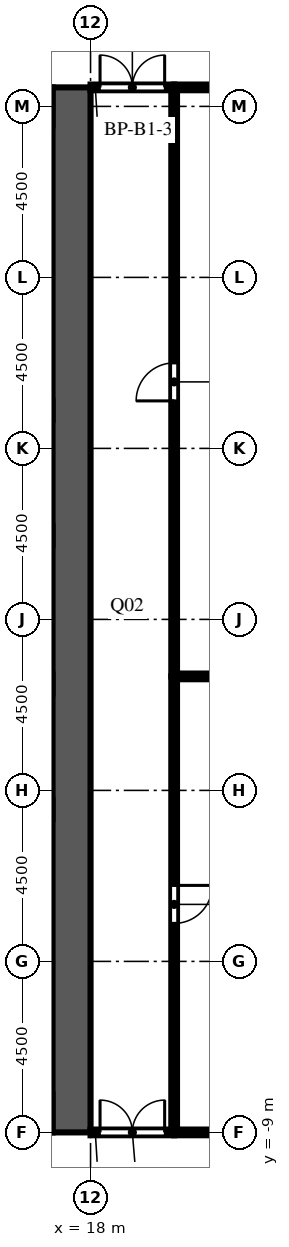
"""IFC4 building model, lengths in metres.
Left out: names, types, materials, properties, quantities, classifications, styles, units other than length and angle.
Written with IfcOpenShell. Run it as: python <this file> out.ifc"""

import sys

from ifc_helpers import new_model, si_unit, direction, frame, frame_2d, origin, place, context, subcontext, project, spatial, rectangle, extrude, element, fill, save


model = new_model("IFC4")
c1 = context("Model", 3, precision=1e-05, world=origin(), true_north=direction((0.0, 1.0)))
c2 = subcontext(c1, "Body", "Model", "MODEL_VIEW")
j1 = project(units=[si_unit("LENGTHUNIT", "METRE"), si_unit("PLANEANGLEUNIT", "RADIAN")], contexts=[c1])
p1 = place(None, origin())
s1 = spatial("IfcSite", under=j1, at=p1, CompositionType="ELEMENT")
p2 = place(p1, origin())
s2 = spatial("IfcBuilding", under=s1, at=p2, CompositionType="ELEMENT")
p3 = place(p2, frame((0.0, 0.0, -5.0)))
s3 = spatial("IfcBuildingStorey", under=s2, at=p3, CompositionType="ELEMENT", Elevation=-5.0)
p4 = place(p3, frame((17.5, -9.0, 0.0), z_axis=(0.0, 0.0, 1.0), x_axis=(0.0, 1.0, 0.0)))
e1 = element("IfcWall", 1, at=p4, inside=s3, PredefinedType="SHEAR", context=c2, shape_type="SweptSolid", body=[
    extrude(rectangle(XDim=27.5, YDim=1.0, at=frame_2d((13.75, 0.0))), origin(), (0.0, 0.0, 1.0), 5.0),
])
p5 = place(p4, frame((12.55, 0.0, 0.0)))
e2 = element("IfcOpeningElement", 2, at=p5, cuts=e1, PredefinedType="OPENING", context=c2, shape_type="SweptSolid", body=[
    extrude(rectangle(XDim=2.4, YDim=2.4, at=frame_2d((1.2, 1.2))), frame((0.0, 0.51, 0.0), z_axis=(0.0, -1.0, 0.0), x_axis=(1.0, 0.0, 0.0)), (0.0, 0.0, 1.0), 1.02),
])
p6 = place(p4, frame((6.825, 0.0, 0.0)))
e3 = element("IfcOpeningElement", 3, at=p6, cuts=e1, PredefinedType="OPENING", context=c2, shape_type="SweptSolid", body=[
    extrude(rectangle(XDim=1.2, YDim=2.1, at=frame_2d((0.6, 1.05))), frame((0.0, 0.51, 0.0), z_axis=(0.0, -1.0, 0.0), x_axis=(1.0, 0.0, 0.0)), (0.0, 0.0, 1.0), 1.02),
])
p7 = place(p4, frame((19.475, 0.0, 0.0)))
e4 = element("IfcOpeningElement", 4, at=p7, cuts=e1, PredefinedType="OPENING", context=c2, shape_type="SweptSolid", body=[
    extrude(rectangle(XDim=1.2, YDim=2.1, at=frame_2d((0.6, 1.05))), frame((0.0, 0.51, 0.0), z_axis=(0.0, -1.0, 0.0), x_axis=(1.0, 0.0, 0.0)), (0.0, 0.0, 1.0), 1.02),
])
p8 = place(p3, frame((18.0, -9.0, 0.0), z_axis=(0.0, 0.0, 1.0), x_axis=(1.0, 0.0, 0.0)))
e5 = element("IfcWall", 5, at=p8, inside=s3, PredefinedType="PARTITIONING", context=c2, shape_type="SweptSolid", body=[
    extrude(rectangle(XDim=2.2, YDim=0.15, at=frame_2d((1.1, 0.0))), origin(), (0.0, 0.0, 1.0), 4.5),
])
p9 = place(p8, frame((0.25, 0.0, 0.0)))
e6 = element("IfcOpeningElement", 6, at=p9, cuts=e5, PredefinedType="OPENING", context=c2, shape_type="SweptSolid", body=[
    extrude(rectangle(XDim=1.7, YDim=2.1, at=frame_2d((0.85, 1.05))), frame((0.0, 0.085, 0.0), z_axis=(0.0, -1.0, 0.0), x_axis=(1.0, 0.0, 0.0)), (0.0, 0.0, 1.0), 0.17),
])
p10 = place(p3, frame((18.0, 18.5, 0.0), z_axis=(0.0, 0.0, 1.0), x_axis=(1.0, 0.0, 0.0)))
e7 = element("IfcWall", 7, at=p10, inside=s3, PredefinedType="PARTITIONING", context=c2, shape_type="SweptSolid", body=[
    extrude(rectangle(XDim=2.2, YDim=0.15, at=frame_2d((1.1, 0.0))), origin(), (0.0, 0.0, 1.0), 4.5),
])
p11 = place(p10, frame((0.25, 0.0, 0.0)))
e8 = element("IfcOpeningElement", 8, at=p11, cuts=e7, PredefinedType="OPENING", context=c2, shape_type="SweptSolid", body=[
    extrude(rectangle(XDim=1.7, YDim=2.1, at=frame_2d((0.85, 1.05))), frame((0.0, 0.085, 0.0), z_axis=(0.0, -1.0, 0.0), x_axis=(1.0, 0.0, 0.0)), (0.0, 0.0, 1.0), 0.17),
])
p12 = place(p3, frame((20.2, -9.0, 0.0), z_axis=(0.0, 0.0, 1.0), x_axis=(0.0, 1.0, 0.0)))
e9 = element("IfcWall", 9, at=p12, inside=s3, PredefinedType="PARTITIONING", context=c2, shape_type="SweptSolid", body=[
    extrude(rectangle(XDim=12.0, YDim=0.15, at=frame_2d((6.0, 0.0))), origin(), (0.0, 0.0, 1.0), 4.5),
])
p13 = place(p12, frame((5.5, 0.0, 0.0)))
e10 = element("IfcOpeningElement", 10, at=p13, cuts=e9, PredefinedType="OPENING", context=c2, shape_type="SweptSolid", body=[
    extrude(rectangle(XDim=1.0, YDim=2.1, at=frame_2d((0.5, 1.05))), frame((0.0, 0.085, 0.0), z_axis=(0.0, -1.0, 0.0), x_axis=(1.0, 0.0, 0.0)), (0.0, 0.0, 1.0), 0.17),
])
p14 = place(p3, frame((20.2, 3.0, 0.0), z_axis=(0.0, 0.0, 1.0), x_axis=(0.0, 1.0, 0.0)))
e11 = element("IfcWall", 11, at=p14, inside=s3, PredefinedType="PARTITIONING", context=c2, shape_type="SweptSolid", body=[
    extrude(rectangle(XDim=15.5, YDim=0.15, at=frame_2d((7.75, 0.0))), origin(), (0.0, 0.0, 1.0), 4.5),
])
p15 = place(p14, frame((7.25, 0.0, 0.0)))
e12 = element("IfcOpeningElement", 12, at=p15, cuts=e11, PredefinedType="OPENING", context=c2, shape_type="SweptSolid", body=[
    extrude(rectangle(XDim=1.0, YDim=2.1, at=frame_2d((0.5, 1.05))), frame((0.0, 0.085, 0.0), z_axis=(0.0, -1.0, 0.0), x_axis=(1.0, 0.0, 0.0)), (0.0, 0.0, 1.0), 0.17),
])
for number, where, z_axis, x_axis in (
    (13, (20.2, -9.0, 0.0), (0.0, 0.0, 1.0), (1.0, 0.0, 0.0)),
    (14, (20.2, 18.5, 0.0), (0.0, 0.0, 1.0), (1.0, 0.0, 0.0)),
):
    element("IfcWall", number, at=place(p3, frame(where, z_axis=z_axis, x_axis=x_axis)), inside=s3, PredefinedType="PARTITIONING", context=c2, shape_type="SweptSolid", body=[
        extrude(rectangle(XDim=1.45, YDim=0.15, at=frame_2d((0.725, 0.0))), origin(), (0.0, 0.0, 1.0), 4.5),
    ])
p16 = place(p3, frame((20.2, 3.0, 0.0), z_axis=(0.0, 0.0, 1.0), x_axis=(1.0, 0.0, 0.0)))
e15 = element("IfcWall", 15, at=p16, inside=s3, PredefinedType="PARTITIONING", context=c2, shape_type="SweptSolid", body=[
    extrude(rectangle(XDim=15.5, YDim=0.15, at=frame_2d((7.75, 0.0))), origin(), (0.0, 0.0, 1.0), 4.5),
])
p17 = place(p5, origin())
e16 = element("IfcDoor", 16, at=p17, inside=s3, OperationType="DOUBLE_DOOR_DOUBLE_SWING", PredefinedType="DOOR", context=c2, shape_type="SweptSolid", body=[
    extrude(rectangle(XDim=2.4, YDim=2.4, at=frame_2d((1.2, 1.2))), frame((0.0, 0.025, 0.0), z_axis=(0.0, -1.0, 0.0), x_axis=(1.0, 0.0, 0.0)), (0.0, 0.0, 1.0), 0.05),
])
fill(e2, e16)
p18 = place(p6, frame((1.2, 0.0, 0.0), z_axis=(0.0, 0.0, 1.0), x_axis=(-1.0, 0.0, 0.0)))
e17 = element("IfcDoor", 17, at=p18, inside=s3, OperationType="SINGLE_SWING_LEFT", PredefinedType="DOOR", context=c2, shape_type="SweptSolid", body=[
    extrude(rectangle(XDim=1.2, YDim=2.1, at=frame_2d((0.6, 1.05))), frame((0.0, 0.025, 0.0), z_axis=(0.0, -1.0, 0.0), x_axis=(1.0, 0.0, 0.0)), (0.0, 0.0, 1.0), 0.05),
])
fill(e3, e17)
p19 = place(p7, frame((1.2, 0.0, 0.0), z_axis=(0.0, 0.0, 1.0), x_axis=(-1.0, 0.0, 0.0)))
e18 = element("IfcDoor", 18, at=p19, inside=s3, OperationType="SINGLE_SWING_LEFT", PredefinedType="DOOR", context=c2, shape_type="SweptSolid", body=[
    extrude(rectangle(XDim=1.2, YDim=2.1, at=frame_2d((0.6, 1.05))), frame((0.0, 0.025, 0.0), z_axis=(0.0, -1.0, 0.0), x_axis=(1.0, 0.0, 0.0)), (0.0, 0.0, 1.0), 0.05),
])
fill(e4, e18)
p20 = place(p13, origin())
e19 = element("IfcDoor", 19, at=p20, inside=s3, OperationType="SINGLE_SWING_RIGHT", PredefinedType="DOOR", context=c2, shape_type="SweptSolid", body=[
    extrude(rectangle(XDim=1.0, YDim=2.1, at=frame_2d((0.5, 1.05))), frame((0.0, 0.025, 0.0), z_axis=(0.0, -1.0, 0.0), x_axis=(1.0, 0.0, 0.0)), (0.0, 0.0, 1.0), 0.05),
])
fill(e10, e19)
p21 = place(p15, origin())
e20 = element("IfcDoor", 20, at=p21, inside=s3, OperationType="SINGLE_SWING_LEFT", PredefinedType="DOOR", context=c2, shape_type="SweptSolid", body=[
    extrude(rectangle(XDim=1.0, YDim=2.1, at=frame_2d((0.5, 1.05))), frame((0.0, 0.025, 0.0), z_axis=(0.0, -1.0, 0.0), x_axis=(1.0, 0.0, 0.0)), (0.0, 0.0, 1.0), 0.05),
])
fill(e12, e20)
p22 = place(p9, origin())
e21 = element("IfcDoor", 21, at=p22, inside=s3, OperationType="DOUBLE_DOOR_DOUBLE_SWING", PredefinedType="DOOR", context=c2, shape_type="SweptSolid", body=[
    extrude(rectangle(XDim=1.7, YDim=2.1, at=frame_2d((0.85, 1.05))), frame((0.0, 0.025, 0.0), z_axis=(0.0, -1.0, 0.0), x_axis=(1.0, 0.0, 0.0)), (0.0, 0.0, 1.0), 0.05),
])
fill(e6, e21)
p23 = place(p11, origin())
e22 = element("IfcDoor", 22, at=p23, inside=s3, OperationType="DOUBLE_DOOR_DOUBLE_SWING", PredefinedType="DOOR", context=c2, shape_type="SweptSolid", body=[
    extrude(rectangle(XDim=1.7, YDim=2.1, at=frame_2d((0.85, 1.05))), frame((0.0, 0.025, 0.0), z_axis=(0.0, -1.0, 0.0), x_axis=(1.0, 0.0, 0.0)), (0.0, 0.0, 1.0), 0.05),
])
fill(e8, e22)
save(model, sys.argv[1])
